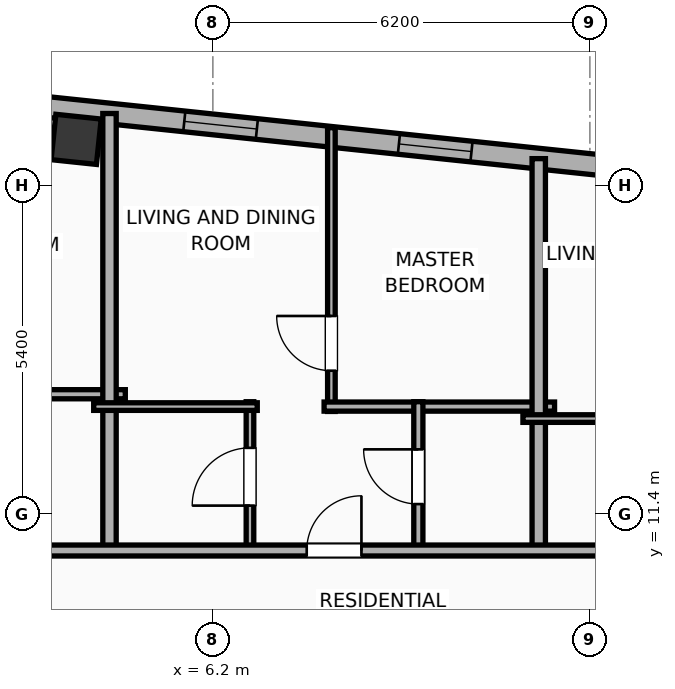
"""IFC4 building model, lengths in metres.
Left out: names, types, materials, properties, quantities, classifications, styles, units other than length and angle.
Written with IfcOpenShell. Run it as: python <this file> out.ifc"""

import sys

from ifc_helpers import new_model, si_unit, direction, frame, frame_2d, origin, origin_2d, place, context, subcontext, project, spatial, rectangle, hollow_rectangle, extrude, element, fill, save


model = new_model("IFC4")
c1 = context("Model", 3, precision=1e-05, world=origin(), true_north=direction((0.0, 1.0)))
c2 = subcontext(c1, "Body", "Model", "MODEL_VIEW")
j1 = project(units=[si_unit("LENGTHUNIT", "METRE"), si_unit("PLANEANGLEUNIT", "RADIAN")], contexts=[c1])
p1 = place(None, origin())
s1 = spatial("IfcSite", under=j1, at=p1, CompositionType="ELEMENT")
p2 = place(p1, origin())
s2 = spatial("IfcBuilding", under=s1, at=p2, CompositionType="ELEMENT")
p3 = place(p2, frame((0.0, 0.0, 283.4)))
s3 = spatial("IfcBuildingStorey", under=s2, at=p3, CompositionType="ELEMENT", Elevation=283.4)
p4 = place(p3, frame((3.952, 17.561, 0.0), z_axis=(0.0, 0.0, 1.0), x_axis=(0.994521895368, -0.104528463268, 0.0)))
e1 = element("IfcColumn", 1, at=p4, inside=s3, PredefinedType="COLUMN", context=c2, shape_type="SweptSolid", body=[
    extrude(hollow_rectangle(XDim=0.75, YDim=0.75, WallThickness=0.025, at=origin_2d()), origin(), (0.0, 0.0, 1.0), 3.9),
])
p5 = place(p3, frame((-23.908, 20.972, 0.0), z_axis=(0.0, 0.0, 1.0), x_axis=(0.994521888554, -0.104528528102, 0.0)))
e2 = element("IfcWall", 2, at=p5, inside=s3, PredefinedType="ELEMENTEDWALL", context=c2, shape_type="SweptSolid", body=[
    extrude(rectangle(XDim=46.766, YDim=0.34, at=frame_2d((23.383, 0.0))), origin(), (0.0, 0.0, 1.0), 3.65),
])
p6 = place(p5, frame((23.833, 0.0, 0.75)))
e3 = element("IfcOpeningElement", 3, at=p6, cuts=e2, PredefinedType="OPENING", context=c2, shape_type="SweptSolid", body=[
    extrude(rectangle(XDim=2.4, YDim=2.1, at=frame_2d((1.2, 1.05))), frame((0.0, 0.18, 0.0), z_axis=(0.0, -1.0, 0.0), x_axis=(1.0, 0.0, 0.0)), (0.0, 0.0, 1.0), 0.36),
])
p7 = place(p5, frame((1.243, 0.0, 0.75)))
e4 = element("IfcOpeningElement", 4, at=p7, cuts=e2, PredefinedType="OPENING", context=c2, shape_type="SweptSolid", body=[
    extrude(rectangle(XDim=1.2, YDim=2.05, at=frame_2d((0.6, 1.025))), frame((0.0, 0.18, 0.0), z_axis=(0.0, -1.0, 0.0), x_axis=(1.0, 0.0, 0.0)), (0.0, 0.0, 1.0), 0.36),
])
p8 = place(p5, frame((4.157, 0.0, 0.75)))
e5 = element("IfcOpeningElement", 5, at=p8, cuts=e2, PredefinedType="OPENING", context=c2, shape_type="SweptSolid", body=[
    extrude(rectangle(XDim=1.2, YDim=2.05, at=frame_2d((0.6, 1.025))), frame((0.0, 0.18, 0.0), z_axis=(0.0, -1.0, 0.0), x_axis=(1.0, 0.0, 0.0)), (0.0, 0.0, 1.0), 0.36),
])
p9 = place(p5, frame((7.475, 0.0, 0.75)))
e6 = element("IfcOpeningElement", 6, at=p9, cuts=e2, PredefinedType="OPENING", context=c2, shape_type="SweptSolid", body=[
    extrude(rectangle(XDim=1.2, YDim=2.05, at=frame_2d((0.6, 1.025))), frame((0.0, 0.18, 0.0), z_axis=(0.0, -1.0, 0.0), x_axis=(1.0, 0.0, 0.0)), (0.0, 0.0, 1.0), 0.36),
])
p10 = place(p5, frame((11.513, 0.0, 0.75)))
e7 = element("IfcOpeningElement", 7, at=p10, cuts=e2, PredefinedType="OPENING", context=c2, shape_type="SweptSolid", body=[
    extrude(rectangle(XDim=1.2, YDim=2.05, at=frame_2d((0.6, 1.025))), frame((0.0, 0.18, 0.0), z_axis=(0.0, -1.0, 0.0), x_axis=(1.0, 0.0, 0.0)), (0.0, 0.0, 1.0), 0.36),
])
p11 = place(p5, frame((15.192, 0.0, 0.75)))
e8 = element("IfcOpeningElement", 8, at=p11, cuts=e2, PredefinedType="OPENING", context=c2, shape_type="SweptSolid", body=[
    extrude(rectangle(XDim=1.2, YDim=2.05, at=frame_2d((0.6, 1.025))), frame((0.0, 0.18, 0.0), z_axis=(0.0, -1.0, 0.0), x_axis=(1.0, 0.0, 0.0)), (0.0, 0.0, 1.0), 0.36),
])
p12 = place(p5, frame((19.671, 0.0, 0.75)))
e9 = element("IfcOpeningElement", 9, at=p12, cuts=e2, PredefinedType="OPENING", context=c2, shape_type="SweptSolid", body=[
    extrude(rectangle(XDim=1.2, YDim=2.05, at=frame_2d((0.6, 1.025))), frame((0.0, 0.18, 0.0), z_axis=(0.0, -1.0, 0.0), x_axis=(1.0, 0.0, 0.0)), (0.0, 0.0, 1.0), 0.36),
])
p13 = place(p5, frame((29.801, 0.0, 0.75)))
e10 = element("IfcOpeningElement", 10, at=p13, cuts=e2, PredefinedType="OPENING", context=c2, shape_type="SweptSolid", body=[
    extrude(rectangle(XDim=1.2, YDim=2.05, at=frame_2d((0.6, 1.025))), frame((0.0, 0.18, 0.0), z_axis=(0.0, -1.0, 0.0), x_axis=(1.0, 0.0, 0.0)), (0.0, 0.0, 1.0), 0.36),
])
p14 = place(p5, frame((33.35, 0.0, 0.75)))
e11 = element("IfcOpeningElement", 11, at=p14, cuts=e2, PredefinedType="OPENING", context=c2, shape_type="SweptSolid", body=[
    extrude(rectangle(XDim=1.2, YDim=2.05, at=frame_2d((0.6, 1.025))), frame((0.0, 0.18, 0.0), z_axis=(0.0, -1.0, 0.0), x_axis=(1.0, 0.0, 0.0)), (0.0, 0.0, 1.0), 0.36),
])
p15 = place(p5, frame((38.034, 0.0, 0.75)))
e12 = element("IfcOpeningElement", 12, at=p15, cuts=e2, PredefinedType="OPENING", context=c2, shape_type="SweptSolid", body=[
    extrude(rectangle(XDim=0.85, YDim=2.05, at=frame_2d((0.425, 1.025))), frame((0.0, 0.18, 0.0), z_axis=(0.0, -1.0, 0.0), x_axis=(1.0, 0.0, 0.0)), (0.0, 0.0, 1.0), 0.36),
])
p16 = place(p5, frame((40.448, 0.0, 0.75)))
e13 = element("IfcOpeningElement", 13, at=p16, cuts=e2, PredefinedType="OPENING", context=c2, shape_type="SweptSolid", body=[
    extrude(rectangle(XDim=1.2, YDim=2.05, at=frame_2d((0.6, 1.025))), frame((0.0, 0.18, 0.0), z_axis=(0.0, -1.0, 0.0), x_axis=(1.0, 0.0, 0.0)), (0.0, 0.0, 1.0), 0.36),
])
p17 = place(p5, frame((43.718, 0.0, 0.75)))
e14 = element("IfcOpeningElement", 14, at=p17, cuts=e2, PredefinedType="OPENING", context=c2, shape_type="SweptSolid", body=[
    extrude(rectangle(XDim=1.2, YDim=2.05, at=frame_2d((0.6, 1.025))), frame((0.0, 0.18, 0.0), z_axis=(0.0, -1.0, 0.0), x_axis=(1.0, 0.0, 0.0)), (0.0, 0.0, 1.0), 0.36),
])
p18 = place(p3, frame((2.551, 13.37, 0.0), z_axis=(0.0, 0.0, 1.0), x_axis=(1.0, 0.0, 0.0)))
e15 = element("IfcWall", 15, at=p18, inside=s3, PredefinedType="PLUMBINGWALL", context=c2, shape_type="SweptSolid", body=[
    extrude(rectangle(XDim=2.209, YDim=0.15, at=frame_2d((1.104, 0.0))), origin(), (0.0, 0.0, 1.0), 3.65),
])
p19 = place(p3, frame((4.5, 10.72, 0.0), z_axis=(0.0, 0.0, 1.0), x_axis=(0.0, 1.0, 0.0)))
e16 = element("IfcWall", 16, at=p19, inside=s3, PredefinedType="PARTITIONING", context=c2, shape_type="SweptSolid", body=[
    extrude(rectangle(XDim=7.266, YDim=0.22, at=frame_2d((3.633, 0.0))), origin(), (0.0, 0.0, 1.0), 3.65),
])
p20 = place(p3, frame((8.149, 13.087, 0.0), z_axis=(0.0, 0.0, 1.0), x_axis=(0.0, 1.0, 0.0)))
e17 = element("IfcWall", 17, at=p20, inside=s3, PredefinedType="PARTITIONING", context=c2, shape_type="SweptSolid", body=[
    extrude(rectangle(XDim=4.667, YDim=0.125, at=frame_2d((2.333, 0.0))), origin(), (0.0, 0.0, 1.0), 3.65),
])
p21 = place(p20, frame((0.67, 0.0, 0.0)))
e18 = element("IfcOpeningElement", 18, at=p21, cuts=e17, PredefinedType="OPENING", context=c2, shape_type="SweptSolid", body=[
    extrude(rectangle(XDim=0.9, YDim=2.05, at=frame_2d((0.45, 1.025))), frame((0.0, 0.073, 0.0), z_axis=(0.0, -1.0, 0.0), x_axis=(1.0, 0.0, 0.0)), (0.0, 0.0, 1.0), 0.145),
])
p22 = place(p3, frame((8.029, 13.167, 0.0), z_axis=(0.0, 0.0, 1.0), x_axis=(1.0, 0.0, 0.0)))
e19 = element("IfcWall", 19, at=p22, inside=s3, PredefinedType="PLUMBINGWALL", context=c2, shape_type="SweptSolid", body=[
    extrude(rectangle(XDim=3.79, YDim=0.15, at=frame_2d((1.895, 0.0))), origin(), (0.0, 0.0, 1.0), 3.65),
])
p23 = place(p3, frame((6.81, 10.78, 0.0), z_axis=(0.0, 0.0, 1.0), x_axis=(0.0, 1.0, 0.0)))
e20 = element("IfcWall", 20, at=p23, inside=s3, PredefinedType="PARTITIONING", context=c2, shape_type="SweptSolid", body=[
    extrude(rectangle(XDim=2.467, YDim=0.125, at=frame_2d((1.233, 0.0))), origin(), (0.0, 0.0, 1.0), 3.65),
])
p24 = place(p23, frame((0.759, 0.0, 0.0)))
e21 = element("IfcOpeningElement", 21, at=p24, cuts=e20, PredefinedType="OPENING", context=c2, shape_type="SweptSolid", body=[
    extrude(rectangle(XDim=0.95, YDim=2.05, at=frame_2d((0.475, 1.025))), frame((0.0, 0.073, 0.0), z_axis=(0.0, -1.0, 0.0), x_axis=(1.0, 0.0, 0.0)), (0.0, 0.0, 1.0), 0.145),
])
p25 = place(p3, frame((4.24, 13.167, 0.0), z_axis=(0.0, 0.0, 1.0), x_axis=(1.0, 0.0, 0.0)))
e22 = element("IfcWall", 22, at=p25, inside=s3, PredefinedType="PARTITIONING", context=c2, shape_type="SweptSolid", body=[
    extrude(rectangle(XDim=2.69, YDim=0.125, at=frame_2d((1.345, 0.0))), origin(), (0.0, 0.0, 1.0), 3.65),
])
p26 = place(p3, frame((9.579, 10.78, 0.0), z_axis=(0.0, 0.0, 1.0), x_axis=(0.0, 1.0, 0.0)))
e23 = element("IfcWall", 23, at=p26, inside=s3, PredefinedType="PLUMBINGWALL", context=c2, shape_type="SweptSolid", body=[
    extrude(rectangle(XDim=2.467, YDim=0.15, at=frame_2d((1.233, 0.0))), origin(), (0.0, 0.0, 1.0), 3.65),
])
p27 = place(p26, frame((0.783, 0.0, 0.0)))
e24 = element("IfcOpeningElement", 24, at=p27, cuts=e23, PredefinedType="OPENING", context=c2, shape_type="SweptSolid", body=[
    extrude(rectangle(XDim=0.9, YDim=2.05, at=frame_2d((0.45, 1.025))), frame((0.0, 0.085, 0.0), z_axis=(0.0, -1.0, 0.0), x_axis=(1.0, 0.0, 0.0)), (0.0, 0.0, 1.0), 0.17),
])
p28 = place(p3, frame((11.559, 10.72, 0.0), z_axis=(0.0, 0.0, 1.0), x_axis=(0.0, 1.0, 0.0)))
e25 = element("IfcWall", 25, at=p28, inside=s3, PredefinedType="PARTITIONING", context=c2, shape_type="SweptSolid", body=[
    extrude(rectangle(XDim=6.524, YDim=0.22, at=frame_2d((3.262, 0.0))), origin(), (0.0, 0.0, 1.0), 3.65),
])
p29 = place(p3, frame((11.299, 12.97, 0.0), z_axis=(0.0, 0.0, 1.0), x_axis=(1.0, 0.0, 0.0)))
e26 = element("IfcWall", 26, at=p29, inside=s3, PredefinedType="PARTITIONING", context=c2, shape_type="SweptSolid", body=[
    extrude(rectangle(XDim=2.69, YDim=0.125, at=frame_2d((1.345, 0.0))), origin(), (0.0, 0.0, 1.0), 3.65),
])
p30 = place(p3, frame((-28.443, 10.8, 0.0), z_axis=(0.0, 0.0, 1.0), x_axis=(1.0, 0.0, 0.0)))
e27 = element("IfcWall", 27, at=p30, inside=s3, PredefinedType="PARTITIONING", context=c2, shape_type="SweptSolid", body=[
    extrude(rectangle(XDim=53.956, YDim=0.18, at=frame_2d((26.978, 0.0))), origin(), (0.0, 0.0, 1.0), 3.65),
])
p31 = place(p30, frame((3.213, 0.0, 0.0)))
e28 = element("IfcOpeningElement", 28, at=p31, cuts=e27, PredefinedType="OPENING", context=c2, shape_type="SweptSolid", body=[
    extrude(rectangle(XDim=1.15, YDim=2.05, at=frame_2d((0.575, 1.025))), frame((0.0, 0.1, 0.0), z_axis=(0.0, -1.0, 0.0), x_axis=(1.0, 0.0, 0.0)), (0.0, 0.0, 1.0), 0.2),
])
p32 = place(p30, frame((10.556, 0.0, 0.0)))
e29 = element("IfcOpeningElement", 29, at=p32, cuts=e27, PredefinedType="OPENING", context=c2, shape_type="SweptSolid", body=[
    extrude(rectangle(XDim=1.15, YDim=2.05, at=frame_2d((0.575, 1.025))), frame((0.0, 0.1, 0.0), z_axis=(0.0, -1.0, 0.0), x_axis=(1.0, 0.0, 0.0)), (0.0, 0.0, 1.0), 0.2),
])
p33 = place(p30, frame((17.872, 0.0, 0.0)))
e30 = element("IfcOpeningElement", 30, at=p33, cuts=e27, PredefinedType="OPENING", context=c2, shape_type="SweptSolid", body=[
    extrude(rectangle(XDim=1.15, YDim=2.05, at=frame_2d((0.575, 1.025))), frame((0.0, 0.1, 0.0), z_axis=(0.0, -1.0, 0.0), x_axis=(1.0, 0.0, 0.0)), (0.0, 0.0, 1.0), 0.2),
])
p34 = place(p30, frame((24.45, 0.0, 0.0)))
e31 = element("IfcOpeningElement", 31, at=p34, cuts=e27, PredefinedType="OPENING", context=c2, shape_type="SweptSolid", body=[
    extrude(rectangle(XDim=0.9, YDim=2.05, at=frame_2d((0.45, 1.025))), frame((0.0, 0.1, 0.0), z_axis=(0.0, -1.0, 0.0), x_axis=(1.0, 0.0, 0.0)), (0.0, 0.0, 1.0), 0.2),
])
p35 = place(p30, frame((29.954, 0.0, 0.0)))
e32 = element("IfcOpeningElement", 32, at=p35, cuts=e27, PredefinedType="OPENING", context=c2, shape_type="SweptSolid", body=[
    extrude(rectangle(XDim=0.9, YDim=2.05, at=frame_2d((0.45, 1.025))), frame((0.0, 0.1, 0.0), z_axis=(0.0, -1.0, 0.0), x_axis=(1.0, 0.0, 0.0)), (0.0, 0.0, 1.0), 0.2),
])
p36 = place(p30, frame((36.186, 0.0, 0.0)))
e33 = element("IfcOpeningElement", 33, at=p36, cuts=e27, PredefinedType="OPENING", context=c2, shape_type="SweptSolid", body=[
    extrude(rectangle(XDim=0.9, YDim=2.05, at=frame_2d((0.45, 1.025))), frame((0.0, 0.1, 0.0), z_axis=(0.0, -1.0, 0.0), x_axis=(1.0, 0.0, 0.0)), (0.0, 0.0, 1.0), 0.2),
])
p37 = place(p30, frame((43.249, 0.0, 0.0)))
e34 = element("IfcOpeningElement", 34, at=p37, cuts=e27, PredefinedType="OPENING", context=c2, shape_type="SweptSolid", body=[
    extrude(rectangle(XDim=0.9, YDim=2.05, at=frame_2d((0.45, 1.025))), frame((0.0, 0.1, 0.0), z_axis=(0.0, -1.0, 0.0), x_axis=(1.0, 0.0, 0.0)), (0.0, 0.0, 1.0), 0.2),
])
p38 = place(p30, frame((50.311, 0.0, 0.0)))
e35 = element("IfcOpeningElement", 35, at=p38, cuts=e27, PredefinedType="OPENING", context=c2, shape_type="SweptSolid", body=[
    extrude(rectangle(XDim=0.9, YDim=2.05, at=frame_2d((0.45, 1.025))), frame((0.0, 0.1, 0.0), z_axis=(0.0, -1.0, 0.0), x_axis=(1.0, 0.0, 0.0)), (0.0, 0.0, 1.0), 0.2),
])
p39 = place(p13, origin())
e36 = element("IfcWindow", 36, at=p39, inside=s3, PartitioningType="SINGLE_PANEL", PredefinedType="WINDOW", context=c2, shape_type="SweptSolid", body=[
    extrude(rectangle(XDim=1.2, YDim=2.05, at=frame_2d((0.6, 1.025))), frame((0.0, 0.03, 0.0), z_axis=(0.0, -1.0, 0.0), x_axis=(1.0, 0.0, 0.0)), (0.0, 0.0, 1.0), 0.06),
])
fill(e10, e36)
p40 = place(p14, origin())
e37 = element("IfcWindow", 37, at=p40, inside=s3, PartitioningType="SINGLE_PANEL", PredefinedType="WINDOW", context=c2, shape_type="SweptSolid", body=[
    extrude(rectangle(XDim=1.2, YDim=2.05, at=frame_2d((0.6, 1.025))), frame((0.0, 0.03, 0.0), z_axis=(0.0, -1.0, 0.0), x_axis=(1.0, 0.0, 0.0)), (0.0, 0.0, 1.0), 0.06),
])
fill(e11, e37)
p41 = place(p21, origin())
e38 = element("IfcDoor", 38, at=p41, inside=s3, OperationType="SINGLE_SWING_RIGHT", PredefinedType="DOOR", context=c2, shape_type="SweptSolid", body=[
    extrude(rectangle(XDim=0.9, YDim=2.05, at=frame_2d((0.45, 1.025))), frame((0.0, 0.025, 0.0), z_axis=(0.0, -1.0, 0.0), x_axis=(1.0, 0.0, 0.0)), (0.0, 0.0, 1.0), 0.05),
])
fill(e18, e38)
p42 = place(p24, origin())
e39 = element("IfcDoor", 39, at=p42, inside=s3, OperationType="SINGLE_SWING_LEFT", PredefinedType="DOOR", context=c2, shape_type="SweptSolid", body=[
    extrude(rectangle(XDim=0.95, YDim=2.05, at=frame_2d((0.475, 1.025))), frame((0.0, 0.025, 0.0), z_axis=(0.0, -1.0, 0.0), x_axis=(1.0, 0.0, 0.0)), (0.0, 0.0, 1.0), 0.05),
])
fill(e21, e39)
p43 = place(p27, origin())
e40 = element("IfcDoor", 40, at=p43, inside=s3, OperationType="SINGLE_SWING_RIGHT", PredefinedType="DOOR", context=c2, shape_type="SweptSolid", body=[
    extrude(rectangle(XDim=0.9, YDim=2.05, at=frame_2d((0.45, 1.025))), frame((0.0, 0.025, 0.0), z_axis=(0.0, -1.0, 0.0), x_axis=(1.0, 0.0, 0.0)), (0.0, 0.0, 1.0), 0.05),
])
fill(e24, e40)
p44 = place(p36, origin())
e41 = element("IfcDoor", 41, at=p44, inside=s3, OperationType="SINGLE_SWING_RIGHT", PredefinedType="DOOR", context=c2, shape_type="SweptSolid", body=[
    extrude(rectangle(XDim=0.9, YDim=2.05, at=frame_2d((0.45, 1.025))), frame((0.0, 0.025, 0.0), z_axis=(0.0, -1.0, 0.0), x_axis=(1.0, 0.0, 0.0)), (0.0, 0.0, 1.0), 0.05),
])
fill(e33, e41)
save(model, sys.argv[1])
